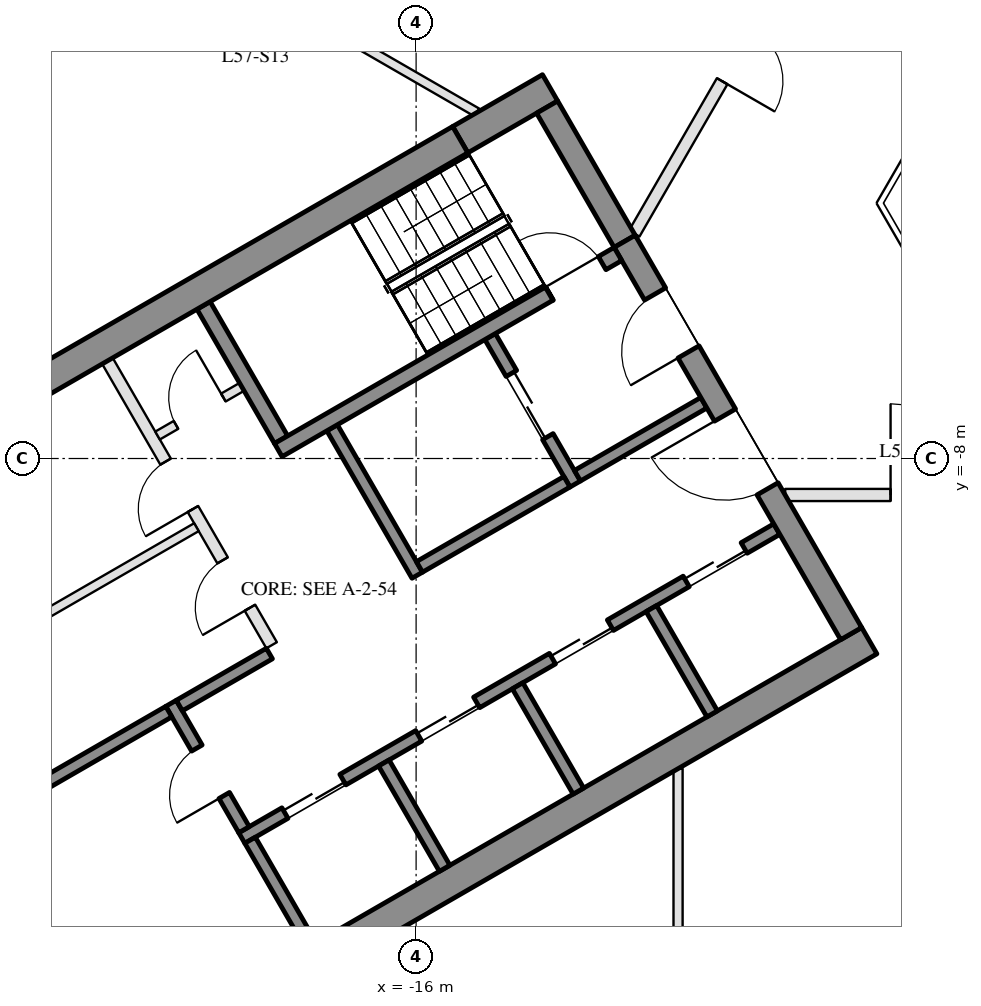
"""IFC4 building model, lengths in metres.
Left out: names, types, materials, properties, quantities, classifications, styles, units other than length and angle.
Written with IfcOpenShell. Run it as: python <this file> out.ifc"""

import sys

from ifc_helpers import new_model, si_unit, direction, frame, frame_2d, origin, place, context, subcontext, project, spatial, rectangle, extrude, element, fill, save


model = new_model("IFC4")
c1 = context("Model", 3, precision=1e-05, world=origin(), true_north=direction((0.0, 1.0)))
c2 = subcontext(c1, "Body", "Model", "MODEL_VIEW")
j1 = project(units=[si_unit("LENGTHUNIT", "METRE"), si_unit("PLANEANGLEUNIT", "RADIAN")], contexts=[c1])
p1 = place(None, origin())
s1 = spatial("IfcSite", under=j1, at=p1, CompositionType="ELEMENT")
p2 = place(p1, origin())
s2 = spatial("IfcBuilding", under=s1, at=p2, CompositionType="ELEMENT")
p3 = place(p2, frame((0.0, 0.0, 231.7)))
s3 = spatial("IfcBuildingStorey", under=s2, at=p3, CompositionType="ELEMENT", Elevation=231.7)
p4 = place(p3, frame((-8.547, -10.997, 0.0), z_axis=(0.0, 0.0, 1.0), x_axis=(-0.866025009528, -0.500000682871, 0.0)))
e1 = element("IfcWall", 1, at=p4, inside=s3, PredefinedType="SHEAR", context=c2, shape_type="SweptSolid", body=[
    extrude(rectangle(XDim=14.837, YDim=0.5, at=frame_2d((7.418, 0.0))), origin(), (0.0, 0.0, 1.0), 5.7),
])
p5 = place(p3, frame((-19.496, -5.482, 0.0), z_axis=(0.0, 0.0, 1.0), x_axis=(0.499990435942, -0.866030925526, 0.0)))
e2 = element("IfcWall", 2, at=p5, inside=s3, PredefinedType="SHEAR", context=c2, shape_type="SweptSolid", body=[
    extrude(rectangle(XDim=2.55, YDim=0.25, at=frame_2d((1.275, 0.0))), origin(), (0.0, 0.0, 1.0), 5.7),
])
p6 = place(p3, frame((-17.381, -7.495, 0.0), z_axis=(0.0, 0.0, 1.0), x_axis=(0.500011755427, -0.866018616679, 0.0)))
e3 = element("IfcWall", 3, at=p6, inside=s3, PredefinedType="SHEAR", context=c2, shape_type="SweptSolid", body=[
    extrude(rectangle(XDim=2.8, YDim=0.2, at=frame_2d((1.4, 0.0))), origin(), (0.0, 0.0, 1.0), 5.7),
])
p7 = place(p3, frame((-14.783, -5.995, 0.0), z_axis=(0.0, 0.0, 1.0), x_axis=(0.49994636267, -0.866056369097, 0.0)))
e4 = element("IfcWall", 4, at=p7, inside=s3, PredefinedType="SHEAR", context=c2, shape_type="SweptSolid", body=[
    extrude(rectangle(XDim=2.8, YDim=0.2, at=frame_2d((1.4, 0.0))), origin(), (0.0, 0.0, 1.0), 5.7),
])
p8 = place(p7, frame((0.7, 0.0, 0.0)))
e5 = element("IfcOpeningElement", 5, at=p8, cuts=e4, PredefinedType="OPENING", context=c2, shape_type="SweptSolid", body=[
    extrude(rectangle(XDim=1.2, YDim=2.1, at=frame_2d((0.6, 1.05))), frame((0.0, 0.11, 0.0), z_axis=(0.0, -1.0, 0.0), x_axis=(1.0, 0.0, 0.0)), (0.0, 0.0, 1.0), 0.22),
])
p9 = place(p3, frame((-13.52, -8.383, 0.0), z_axis=(0.0, 0.0, 1.0), x_axis=(-0.866034573852, -0.49998411664, 0.0)))
e6 = element("IfcWall", 6, at=p9, inside=s3, PredefinedType="SHEAR", context=c2, shape_type="SweptSolid", body=[
    extrude(rectangle(XDim=2.8, YDim=0.2, at=frame_2d((1.4, 0.0))), origin(), (0.0, 0.0, 1.0), 5.7),
])
p10 = place(p3, frame((-11.268, -7.083, 0.0), z_axis=(0.0, 0.0, 1.0), x_axis=(-0.866050077142, -0.499957262057, 0.0)))
e7 = element("IfcWall", 7, at=p10, inside=s3, PredefinedType="SHEAR", context=c2, shape_type="SweptSolid", body=[
    extrude(rectangle(XDim=2.4, YDim=0.2, at=frame_2d((1.2, 0.0))), origin(), (0.0, 0.0, 1.0), 5.7),
])
p11 = place(p3, frame((-10.068, -9.162, 0.0), z_axis=(0.0, 0.0, 1.0), x_axis=(-0.866032725843, -0.499987317609, 0.0)))
e8 = element("IfcWall", 8, at=p11, inside=s3, PredefinedType="SHEAR", context=c2, shape_type="SweptSolid", body=[
    extrude(rectangle(XDim=10.16, YDim=0.2, at=frame_2d((5.08, 0.0))), origin(), (0.0, 0.0, 1.0), 5.7),
])
p12 = place(p11, frame((0.62, 0.0, 0.0)))
e9 = element("IfcOpeningElement", 9, at=p12, cuts=e8, PredefinedType="OPENING", context=c2, shape_type="SweptSolid", body=[
    extrude(rectangle(XDim=1.1, YDim=2.1, at=frame_2d((0.55, 1.05))), frame((0.0, 0.11, 0.0), z_axis=(0.0, -1.0, 0.0), x_axis=(1.0, 0.0, 0.0)), (0.0, 0.0, 1.0), 0.22),
])
p13 = place(p11, frame((3.16, 0.0, 0.0)))
e10 = element("IfcOpeningElement", 10, at=p13, cuts=e8, PredefinedType="OPENING", context=c2, shape_type="SweptSolid", body=[
    extrude(rectangle(XDim=1.1, YDim=2.1, at=frame_2d((0.55, 1.05))), frame((0.0, 0.11, 0.0), z_axis=(0.0, -1.0, 0.0), x_axis=(1.0, 0.0, 0.0)), (0.0, 0.0, 1.0), 0.22),
])
p14 = place(p11, frame((5.7, 0.0, 0.0)))
e11 = element("IfcOpeningElement", 11, at=p14, cuts=e8, PredefinedType="OPENING", context=c2, shape_type="SweptSolid", body=[
    extrude(rectangle(XDim=1.1, YDim=2.1, at=frame_2d((0.55, 1.05))), frame((0.0, 0.11, 0.0), z_axis=(0.0, -1.0, 0.0), x_axis=(1.0, 0.0, 0.0)), (0.0, 0.0, 1.0), 0.22),
])
p15 = place(p11, frame((8.24, 0.0, 0.0)))
e12 = element("IfcOpeningElement", 12, at=p15, cuts=e8, PredefinedType="OPENING", context=c2, shape_type="SweptSolid", body=[
    extrude(rectangle(XDim=1.1, YDim=2.1, at=frame_2d((0.55, 1.05))), frame((0.0, 0.11, 0.0), z_axis=(0.0, -1.0, 0.0), x_axis=(1.0, 0.0, 0.0)), (0.0, 0.0, 1.0), 0.22),
])
p16 = place(p3, frame((-20.031, -12.026, 0.0), z_axis=(0.0, 0.0, 1.0), x_axis=(0.500033551112, -0.866006032174, 0.0)))
e13 = element("IfcWall", 13, at=p16, inside=s3, PredefinedType="SHEAR", context=c2, shape_type="SweptSolid", body=[
    extrude(rectangle(XDim=2.4, YDim=0.2, at=frame_2d((1.2, 0.0))), origin(), (0.0, 0.0, 1.0), 5.7),
])
p17 = place(p16, frame((0.85, 0.0, 0.0)))
e14 = element("IfcOpeningElement", 14, at=p17, cuts=e13, PredefinedType="OPENING", context=c2, shape_type="SweptSolid", body=[
    extrude(rectangle(XDim=0.9, YDim=2.1, at=frame_2d((0.45, 1.05))), frame((0.0, 0.11, 0.0), z_axis=(0.0, -1.0, 0.0), x_axis=(1.0, 0.0, 0.0)), (0.0, 0.0, 1.0), 0.22),
])
p18 = place(p3, frame((-18.413, -11.208, 0.0), z_axis=(0.0, 0.0, 1.0), x_axis=(-0.866038183914, -0.499977863513, 0.0)))
e15 = element("IfcWall", 15, at=p18, inside=s3, PredefinedType="SHEAR", context=c2, shape_type="SweptSolid", body=[
    extrude(rectangle(XDim=1.71, YDim=0.2, at=frame_2d((0.855, 0.0))), origin(), (0.0, 0.0, 1.0), 5.7),
])
for number, where, z_axis, x_axis in (
    (16, (-12.131, -10.468, 0.0), (0.0, 0.0, 1.0), (0.5, -0.866, 0.0)),
    (17, (-14.331, -11.738, 0.0), (0.0, 0.0, 1.0), (0.5, -0.866, 0.0)),
    (18, (-16.531, -13.008, 0.0), (0.0, 0.0, 1.0), (0.5, -0.866, 0.0)),
    (19, (-18.73, -14.278, 0.0), (0.0, 0.0, 1.0), (0.5, -0.866, 0.0)),
):
    element("IfcWall", number, at=place(p3, frame(where, z_axis=z_axis, x_axis=x_axis)), inside=s3, PredefinedType="SHEAR", context=c2, shape_type="SweptSolid", body=[
        extrude(rectangle(XDim=2.0, YDim=0.2, at=frame_2d((1.0, 0.0))), origin(), (0.0, 0.0, 1.0), 5.7),
    ])
p19 = place(p3, frame((-20.067, -12.163, 0.0), z_axis=(0.0, 0.0, 1.0), x_axis=(-0.866055327414, -0.49994816717, 0.0)))
e20 = element("IfcWall", 20, at=p19, inside=s3, PredefinedType="SHEAR", context=c2, shape_type="SweptSolid", body=[
    extrude(rectangle(XDim=2.84, YDim=0.2, at=frame_2d((1.42, 0.0))), origin(), (0.0, 0.0, 1.0), 5.7),
])
p20 = place(p3, frame((-21.076, -6.395, 0.0), z_axis=(0.0, 0.0, 1.0), x_axis=(0.50001468107, -0.866016927499, 0.0)))
e21 = element("IfcWall", 21, at=p20, inside=s3, PredefinedType="PARTITIONING", context=c2, shape_type="SweptSolid", body=[
    extrude(rectangle(XDim=5.4, YDim=0.2, at=frame_2d((2.7, 0.0))), origin(), (0.0, 0.0, 1.0), 5.7),
])
p21 = place(p20, frame((1.913, 0.0, 0.0)))
e22 = element("IfcOpeningElement", 22, at=p21, cuts=e21, PredefinedType="OPENING", context=c2, shape_type="SweptSolid", body=[
    extrude(rectangle(XDim=0.9, YDim=2.1, at=frame_2d((0.45, 1.05))), frame((0.0, 0.11, 0.0), z_axis=(0.0, -1.0, 0.0), x_axis=(1.0, 0.0, 0.0)), (0.0, 0.0, 1.0), 0.22),
])
p22 = place(p20, frame((3.788, 0.0, 0.0)))
e23 = element("IfcOpeningElement", 23, at=p22, cuts=e21, PredefinedType="OPENING", context=c2, shape_type="SweptSolid", body=[
    extrude(rectangle(XDim=0.9, YDim=2.1, at=frame_2d((0.45, 1.05))), frame((0.0, 0.11, 0.0), z_axis=(0.0, -1.0, 0.0), x_axis=(1.0, 0.0, 0.0)), (0.0, 0.0, 1.0), 0.22),
])
p23 = place(p3, frame((-18.866, -6.822, 0.0), z_axis=(0.0, 0.0, 1.0), x_axis=(-0.866028054938, -0.499995408039, 0.0)))
e24 = element("IfcWall", 24, at=p23, inside=s3, PredefinedType="PARTITIONING", context=c2, shape_type="SweptSolid", body=[
    extrude(rectangle(XDim=1.6, YDim=0.15, at=frame_2d((0.8, 0.0))), origin(), (0.0, 0.0, 1.0), 5.7),
])
p24 = place(p23, frame((0.35, 0.0, 0.0)))
e25 = element("IfcOpeningElement", 25, at=p24, cuts=e24, PredefinedType="OPENING", context=c2, shape_type="SweptSolid", body=[
    extrude(rectangle(XDim=0.9, YDim=2.1, at=frame_2d((0.45, 1.05))), frame((0.0, 0.085, 0.0), z_axis=(0.0, -1.0, 0.0), x_axis=(1.0, 0.0, 0.0)), (0.0, 0.0, 1.0), 0.17),
])
p25 = place(p3, frame((-19.613, -9.13, 0.0), z_axis=(0.0, 0.0, 1.0), x_axis=(-0.866031734426, -0.499989034847, 0.0)))
e26 = element("IfcWall", 26, at=p25, inside=s3, PredefinedType="PARTITIONING", context=c2, shape_type="SweptSolid", body=[
    extrude(rectangle(XDim=6.95, YDim=0.15, at=frame_2d((3.475, 0.0))), origin(), (0.0, 0.0, 1.0), 5.7),
])
p26 = place(p3, frame((-13.797, -1.903, 0.0), z_axis=(0.0, 0.0, 1.0), x_axis=(-0.866033076574, -0.499986710104, 0.0)))
e27 = element("IfcWall", 27, at=p26, inside=s3, PredefinedType="SHEAR", context=c2, shape_type="SweptSolid", body=[
    extrude(rectangle(XDim=1.706, YDim=0.5, at=frame_2d((0.853, 0.0))), origin(), (0.0, 0.0, 1.0), 5.7),
])
p27 = place(p3, frame((-15.274, -2.756, 0.0), z_axis=(0.0, 0.0, 1.0), x_axis=(-0.86602396135, -0.500002498361, 0.0)))
e28 = element("IfcWall", 28, at=p27, inside=s3, PredefinedType="SHEAR", context=c2, shape_type="SweptSolid", body=[
    extrude(rectangle(XDim=13.131, YDim=0.5, at=frame_2d((6.565, 0.0))), origin(), (0.0, 0.0, 1.0), 5.7),
])
p28 = place(p3, frame((-13.845, -2.22, 0.0), z_axis=(0.0, 0.0, 1.0), x_axis=(0.500062241894, -0.865989465428, 0.0)))
e29 = element("IfcWall", 29, at=p28, inside=s3, PredefinedType="SHEAR", context=c2, shape_type="SweptSolid", body=[
    extrude(rectangle(XDim=2.55, YDim=0.4, at=frame_2d((1.275, 0.0))), origin(), (0.0, 0.0, 1.0), 5.7),
])
p29 = place(p3, frame((-12.57, -4.428, 0.0), z_axis=(0.0, 0.0, 1.0), x_axis=(0.499984378957, -0.86603442241, 0.0)))
e30 = element("IfcWall", 30, at=p29, inside=s3, PredefinedType="SHEAR", context=c2, shape_type="SweptSolid", body=[
    extrude(rectangle(XDim=7.45, YDim=0.4, at=frame_2d((3.725, 0.0))), origin(), (0.0, 0.0, 1.0), 5.7),
])
p30 = place(p29, frame((1.0, 0.0, 0.0)))
e31 = element("IfcOpeningElement", 31, at=p30, cuts=e30, PredefinedType="OPENING", context=c2, shape_type="SweptSolid", body=[
    extrude(rectangle(XDim=1.1, YDim=2.1, at=frame_2d((0.55, 1.05))), frame((0.0, 0.21, 0.0), z_axis=(0.0, -1.0, 0.0), x_axis=(1.0, 0.0, 0.0)), (0.0, 0.0, 1.0), 0.42),
])
p31 = place(p29, frame((3.3, 0.0, 0.0)))
e32 = element("IfcOpeningElement", 32, at=p31, cuts=e30, PredefinedType="OPENING", context=c2, shape_type="SweptSolid", body=[
    extrude(rectangle(XDim=1.4, YDim=2.1, at=frame_2d((0.7, 1.05))), frame((0.0, 0.21, 0.0), z_axis=(0.0, -1.0, 0.0), x_axis=(1.0, 0.0, 0.0)), (0.0, 0.0, 1.0), 0.42),
])
p32 = place(p3, frame((-12.681, -4.636, 0.0), z_axis=(0.0, 0.0, 1.0), x_axis=(-0.86601437931, -0.500019094464, 0.0)))
e33 = element("IfcWall", 33, at=p32, inside=s3, PredefinedType="SHEAR", context=c2, shape_type="SweptSolid", body=[
    extrude(rectangle(XDim=1.306, YDim=0.25, at=frame_2d((0.653, 0.0))), origin(), (0.0, 0.0, 1.0), 5.7),
])
p33 = place(p32, frame((0.3, 0.0, 0.0)))
e34 = element("IfcOpeningElement", 34, at=p33, cuts=e33, PredefinedType="OPENING", context=c2, shape_type="SweptSolid", body=[
    extrude(rectangle(XDim=1.0, YDim=2.1, at=frame_2d((0.5, 1.05))), frame((0.0, 0.135, 0.0), z_axis=(0.0, -1.0, 0.0), x_axis=(1.0, 0.0, 0.0)), (0.0, 0.0, 1.0), 0.27),
])
p34 = place(p3, frame((-13.812, -5.29, 0.0), z_axis=(0.0, 0.0, 1.0), x_axis=(-0.866023561601, -0.500003190742, 0.0)))
e35 = element("IfcWall", 35, at=p34, inside=s3, PredefinedType="SHEAR", context=c2, shape_type="SweptSolid", body=[
    extrude(rectangle(XDim=5.144, YDim=0.25, at=frame_2d((2.572, 0.0))), origin(), (0.0, 0.0, 1.0), 5.7),
])
p35 = place(p3, frame((-11.692, -19.43, 0.0), z_axis=(0.0, 0.0, 1.0), x_axis=(0.0, 1.0, 0.0)))
e36 = element("IfcWall", 36, at=p35, inside=s3, PredefinedType="PARTITIONING", context=c2, shape_type="SweptSolid", body=[
    extrude(rectangle(XDim=6.329, YDim=0.15, at=frame_2d((3.165, 0.0))), origin(), (0.0, 0.0, 1.0), 5.7),
])
p36 = place(p35, frame((2.714, 0.0, 0.0)))
e37 = element("IfcOpeningElement", 37, at=p36, cuts=e36, PredefinedType="OPENING", context=c2, shape_type="SweptSolid", body=[
    extrude(rectangle(XDim=0.9, YDim=2.1, at=frame_2d((0.45, 1.05))), frame((0.0, 0.085, 0.0), z_axis=(0.0, -1.0, 0.0), x_axis=(1.0, 0.0, 0.0)), (0.0, 0.0, 1.0), 0.17),
])
p37 = place(p3, frame((-9.93, -8.6, 0.0), z_axis=(0.0, 0.0, 1.0), x_axis=(1.0, 0.0, 0.0)))
e38 = element("IfcWall", 38, at=p37, inside=s3, PredefinedType="PARTITIONING", context=c2, shape_type="SweptSolid", body=[
    extrude(rectangle(XDim=19.861, YDim=0.2, at=frame_2d((9.93, 0.0))), origin(), (0.0, 0.0, 1.0), 4.91),
])
p38 = place(p37, frame((1.734, 0.0, 0.0)))
e39 = element("IfcOpeningElement", 39, at=p38, cuts=e38, PredefinedType="OPENING", context=c2, shape_type="SweptSolid", body=[
    extrude(rectangle(XDim=1.5, YDim=2.1, at=frame_2d((0.75, 1.05))), frame((0.0, 0.11, 0.0), z_axis=(0.0, -1.0, 0.0), x_axis=(1.0, 0.0, 0.0)), (0.0, 0.0, 1.0), 0.22),
])
p39 = place(p37, frame((6.637, 0.0, 0.0)))
e40 = element("IfcOpeningElement", 40, at=p39, cuts=e38, PredefinedType="OPENING", context=c2, shape_type="SweptSolid", body=[
    extrude(rectangle(XDim=1.8, YDim=2.4, at=frame_2d((0.9, 1.2))), frame((0.0, 0.11, 0.0), z_axis=(0.0, -1.0, 0.0), x_axis=(1.0, 0.0, 0.0)), (0.0, 0.0, 1.0), 0.22),
])
p40 = place(p37, frame((11.924, 0.0, 0.0)))
e41 = element("IfcOpeningElement", 41, at=p40, cuts=e38, PredefinedType="OPENING", context=c2, shape_type="SweptSolid", body=[
    extrude(rectangle(XDim=1.8, YDim=2.4, at=frame_2d((0.9, 1.2))), frame((0.0, 0.11, 0.0), z_axis=(0.0, -1.0, 0.0), x_axis=(1.0, 0.0, 0.0)), (0.0, 0.0, 1.0), 0.22),
])
p41 = place(p37, frame((17.028, 0.0, 0.0)))
e42 = element("IfcOpeningElement", 42, at=p41, cuts=e38, PredefinedType="OPENING", context=c2, shape_type="SweptSolid", body=[
    extrude(rectangle(XDim=1.2, YDim=2.1, at=frame_2d((0.6, 1.05))), frame((0.0, 0.11, 0.0), z_axis=(0.0, -1.0, 0.0), x_axis=(1.0, 0.0, 0.0)), (0.0, 0.0, 1.0), 0.22),
])
p42 = place(p3, frame((-21.577, 1.488, 0.0), z_axis=(0.0, 0.0, 1.0), x_axis=(0.866014808974, -0.500018350302, 0.0)))
e43 = element("IfcWall", 43, at=p42, inside=s3, PredefinedType="PARTITIONING", context=c2, shape_type="SweptSolid", body=[
    extrude(rectangle(XDim=7.594, YDim=0.15, at=frame_2d((3.797, 0.0))), origin(), (0.0, 0.0, 1.0), 5.7),
])
p43 = place(p42, frame((3.347, 0.0, 0.0)))
e44 = element("IfcOpeningElement", 44, at=p43, cuts=e43, PredefinedType="OPENING", context=c2, shape_type="SweptSolid", body=[
    extrude(rectangle(XDim=0.9, YDim=2.1, at=frame_2d((0.45, 1.05))), frame((0.0, 0.085, 0.0), z_axis=(0.0, -1.0, 0.0), x_axis=(1.0, 0.0, 0.0)), (0.0, 0.0, 1.0), 0.17),
])
p44 = place(p3, frame((-2.482, 12.9, 0.0), z_axis=(0.0, 0.0, 1.0), x_axis=(-0.50000478328, -0.866022642139, 0.0)))
e45 = element("IfcWall", 45, at=p44, inside=s3, PredefinedType="PARTITIONING", context=c2, shape_type="SweptSolid", body=[
    extrude(rectangle(XDim=19.861, YDim=0.2, at=frame_2d((9.931, 0.0))), origin(), (0.0, 0.0, 1.0), 4.91),
])
p45 = place(p44, frame((2.968, 0.0, 0.0)))
e46 = element("IfcOpeningElement", 46, at=p45, cuts=e45, PredefinedType="OPENING", context=c2, shape_type="SweptSolid", body=[
    extrude(rectangle(XDim=1.5, YDim=2.1, at=frame_2d((0.75, 1.05))), frame((0.0, 0.11, 0.0), z_axis=(0.0, -1.0, 0.0), x_axis=(1.0, 0.0, 0.0)), (0.0, 0.0, 1.0), 0.22),
])
p46 = place(p44, frame((15.968, 0.0, 0.0)))
e47 = element("IfcOpeningElement", 47, at=p46, cuts=e45, PredefinedType="OPENING", context=c2, shape_type="SweptSolid", body=[
    extrude(rectangle(XDim=1.0, YDim=2.1, at=frame_2d((0.5, 1.05))), frame((0.0, 0.11, 0.0), z_axis=(0.0, -1.0, 0.0), x_axis=(1.0, 0.0, 0.0)), (0.0, 0.0, 1.0), 0.22),
])
p47 = place(p44, frame((9.43, 0.0, 0.0)))
e48 = element("IfcOpeningElement", 48, at=p47, cuts=e45, PredefinedType="OPENING", context=c2, shape_type="SweptSolid", body=[
    extrude(rectangle(XDim=1.0, YDim=2.1, at=frame_2d((0.5, 1.05))), frame((0.0, 0.11, 0.0), z_axis=(0.0, -1.0, 0.0), x_axis=(1.0, 0.0, 0.0)), (0.0, 0.0, 1.0), 0.22),
])
p48 = place(p8, origin())
e49 = element("IfcDoor", 49, at=p48, inside=s3, OperationType="DOUBLE_DOOR_SLIDING", PredefinedType="DOOR", context=c2, shape_type="SweptSolid", body=[
    extrude(rectangle(XDim=1.2, YDim=2.1, at=frame_2d((0.6, 1.05))), frame((0.0, 0.025, 0.0), z_axis=(0.0, -1.0, 0.0), x_axis=(1.0, 0.0, 0.0)), (0.0, 0.0, 1.0), 0.05),
])
fill(e5, e49)
p49 = place(p24, frame((0.9, 0.0, 0.0), z_axis=(0.0, 0.0, 1.0), x_axis=(-1.0, 0.0, 0.0)))
e50 = element("IfcDoor", 50, at=p49, inside=s3, OperationType="SINGLE_SWING_RIGHT", PredefinedType="DOOR", context=c2, shape_type="SweptSolid", body=[
    extrude(rectangle(XDim=0.9, YDim=2.1, at=frame_2d((0.45, 1.05))), frame((0.0, 0.025, 0.0), z_axis=(0.0, -1.0, 0.0), x_axis=(1.0, 0.0, 0.0)), (0.0, 0.0, 1.0), 0.05),
])
fill(e25, e50)
p50 = place(p12, origin())
e51 = element("IfcDoor", 51, at=p50, inside=s3, OperationType="DOUBLE_DOOR_SLIDING", PredefinedType="DOOR", context=c2, shape_type="SweptSolid", body=[
    extrude(rectangle(XDim=1.1, YDim=2.1, at=frame_2d((0.55, 1.05))), frame((0.0, 0.025, 0.0), z_axis=(0.0, -1.0, 0.0), x_axis=(1.0, 0.0, 0.0)), (0.0, 0.0, 1.0), 0.05),
])
fill(e9, e51)
p51 = place(p13, origin())
e52 = element("IfcDoor", 52, at=p51, inside=s3, OperationType="DOUBLE_DOOR_SLIDING", PredefinedType="DOOR", context=c2, shape_type="SweptSolid", body=[
    extrude(rectangle(XDim=1.1, YDim=2.1, at=frame_2d((0.55, 1.05))), frame((0.0, 0.025, 0.0), z_axis=(0.0, -1.0, 0.0), x_axis=(1.0, 0.0, 0.0)), (0.0, 0.0, 1.0), 0.05),
])
fill(e10, e52)
p52 = place(p14, origin())
e53 = element("IfcDoor", 53, at=p52, inside=s3, OperationType="DOUBLE_DOOR_SLIDING", PredefinedType="DOOR", context=c2, shape_type="SweptSolid", body=[
    extrude(rectangle(XDim=1.1, YDim=2.1, at=frame_2d((0.55, 1.05))), frame((0.0, 0.025, 0.0), z_axis=(0.0, -1.0, 0.0), x_axis=(1.0, 0.0, 0.0)), (0.0, 0.0, 1.0), 0.05),
])
fill(e11, e53)
p53 = place(p15, origin())
e54 = element("IfcDoor", 54, at=p53, inside=s3, OperationType="DOUBLE_DOOR_SLIDING", PredefinedType="DOOR", context=c2, shape_type="SweptSolid", body=[
    extrude(rectangle(XDim=1.1, YDim=2.1, at=frame_2d((0.55, 1.05))), frame((0.0, 0.025, 0.0), z_axis=(0.0, -1.0, 0.0), x_axis=(1.0, 0.0, 0.0)), (0.0, 0.0, 1.0), 0.05),
])
fill(e12, e54)
p54 = place(p17, frame((0.9, 0.0, 0.0), z_axis=(0.0, 0.0, 1.0), x_axis=(-1.0, 0.0, 0.0)))
e55 = element("IfcDoor", 55, at=p54, inside=s3, OperationType="SINGLE_SWING_LEFT", PredefinedType="DOOR", context=c2, shape_type="SweptSolid", body=[
    extrude(rectangle(XDim=0.9, YDim=2.1, at=frame_2d((0.45, 1.05))), frame((0.0, 0.025, 0.0), z_axis=(0.0, -1.0, 0.0), x_axis=(1.0, 0.0, 0.0)), (0.0, 0.0, 1.0), 0.05),
])
fill(e14, e55)
p55 = place(p21, frame((0.9, 0.0, 0.0), z_axis=(0.0, 0.0, 1.0), x_axis=(-1.0, 0.0, 0.0)))
e56 = element("IfcDoor", 56, at=p55, inside=s3, OperationType="SINGLE_SWING_LEFT", PredefinedType="DOOR", context=c2, shape_type="SweptSolid", body=[
    extrude(rectangle(XDim=0.9, YDim=2.1, at=frame_2d((0.45, 1.05))), frame((0.0, 0.025, 0.0), z_axis=(0.0, -1.0, 0.0), x_axis=(1.0, 0.0, 0.0)), (0.0, 0.0, 1.0), 0.05),
])
fill(e22, e56)
p56 = place(p22, frame((0.9, 0.0, 0.0), z_axis=(0.0, 0.0, 1.0), x_axis=(-1.0, 0.0, 0.0)))
e57 = element("IfcDoor", 57, at=p56, inside=s3, OperationType="SINGLE_SWING_LEFT", PredefinedType="DOOR", context=c2, shape_type="SweptSolid", body=[
    extrude(rectangle(XDim=0.9, YDim=2.1, at=frame_2d((0.45, 1.05))), frame((0.0, 0.025, 0.0), z_axis=(0.0, -1.0, 0.0), x_axis=(1.0, 0.0, 0.0)), (0.0, 0.0, 1.0), 0.05),
])
fill(e23, e57)
p57 = place(p30, frame((1.1, 0.0, 0.0), z_axis=(0.0, 0.0, 1.0), x_axis=(-1.0, 0.0, 0.0)))
e58 = element("IfcDoor", 58, at=p57, inside=s3, OperationType="SINGLE_SWING_LEFT", PredefinedType="DOOR", context=c2, shape_type="SweptSolid", body=[
    extrude(rectangle(XDim=1.1, YDim=2.1, at=frame_2d((0.55, 1.05))), frame((0.0, 0.025, 0.0), z_axis=(0.0, -1.0, 0.0), x_axis=(1.0, 0.0, 0.0)), (0.0, 0.0, 1.0), 0.05),
])
fill(e31, e58)
p58 = place(p31, frame((1.4, 0.0, 0.0), z_axis=(0.0, 0.0, 1.0), x_axis=(-1.0, 0.0, 0.0)))
e59 = element("IfcDoor", 59, at=p58, inside=s3, OperationType="DOUBLE_DOOR_SINGLE_SWING", PredefinedType="DOOR", context=c2, shape_type="SweptSolid", body=[
    extrude(rectangle(XDim=1.4, YDim=2.1, at=frame_2d((0.7, 1.05))), frame((0.0, 0.025, 0.0), z_axis=(0.0, -1.0, 0.0), x_axis=(1.0, 0.0, 0.0)), (0.0, 0.0, 1.0), 0.05),
])
fill(e32, e59)
p59 = place(p33, frame((1.0, 0.0, 0.0), z_axis=(0.0, 0.0, 1.0), x_axis=(-1.0, 0.0, 0.0)))
e60 = element("IfcDoor", 60, at=p59, inside=s3, OperationType="SINGLE_SWING_LEFT", PredefinedType="DOOR", context=c2, shape_type="SweptSolid", body=[
    extrude(rectangle(XDim=1.0, YDim=2.1, at=frame_2d((0.5, 1.05))), frame((0.0, 0.025, 0.0), z_axis=(0.0, -1.0, 0.0), x_axis=(1.0, 0.0, 0.0)), (0.0, 0.0, 1.0), 0.05),
])
fill(e34, e60)
p60 = place(p38, origin())
e61 = element("IfcDoor", 61, at=p60, inside=s3, OperationType="DOUBLE_DOOR_SINGLE_SWING", PredefinedType="DOOR", context=c2, shape_type="SweptSolid", body=[
    extrude(rectangle(XDim=1.5, YDim=2.1, at=frame_2d((0.75, 1.05))), frame((0.0, 0.025, 0.0), z_axis=(0.0, -1.0, 0.0), x_axis=(1.0, 0.0, 0.0)), (0.0, 0.0, 1.0), 0.05),
])
fill(e39, e61)
p61 = place(p46, origin())
e62 = element("IfcDoor", 62, at=p61, inside=s3, OperationType="SINGLE_SWING_RIGHT", PredefinedType="DOOR", context=c2, shape_type="SweptSolid", body=[
    extrude(rectangle(XDim=1.0, YDim=2.1, at=frame_2d((0.5, 1.05))), frame((0.0, 0.025, 0.0), z_axis=(0.0, -1.0, 0.0), x_axis=(1.0, 0.0, 0.0)), (0.0, 0.0, 1.0), 0.05),
])
fill(e47, e62)
save(model, sys.argv[1])
